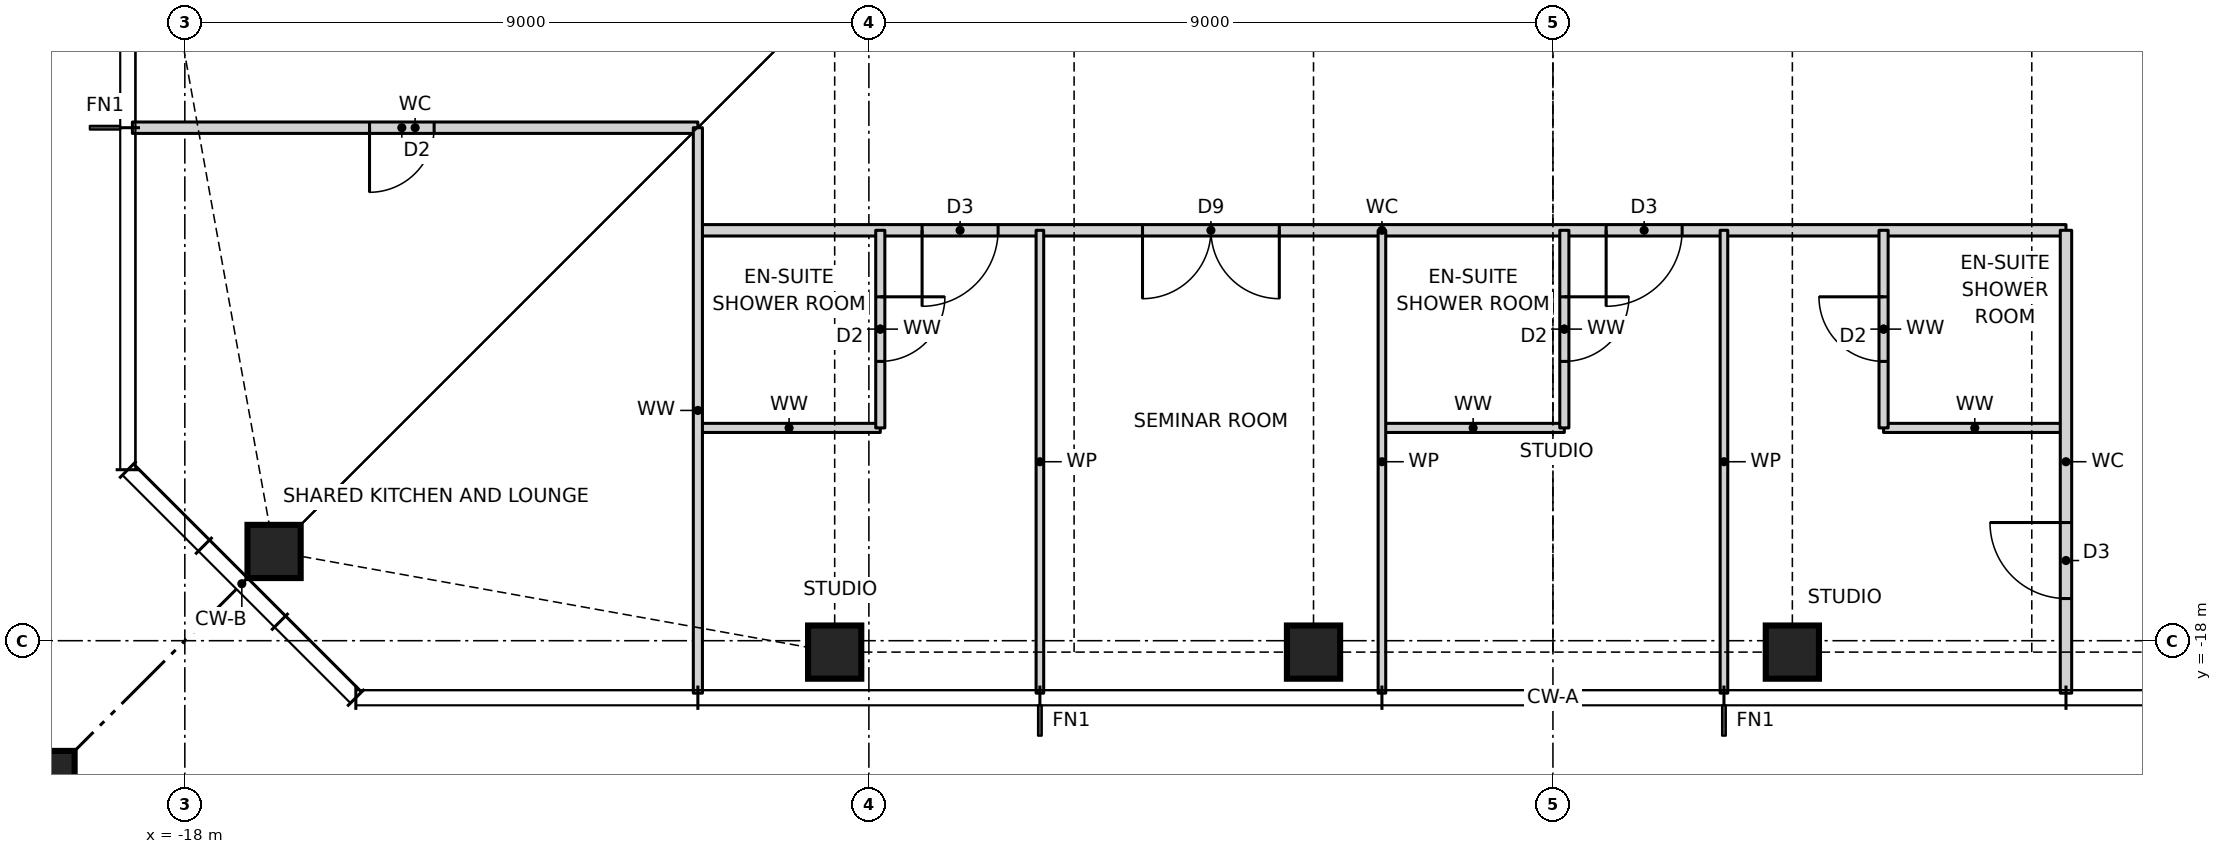
"""IFC4 building model, lengths in metres.
Left out: names, types, materials, properties, quantities, classifications, styles, units other than length and angle.
Written with IfcOpenShell. Run it as: python <this file> out.ifc"""

import sys

from ifc_helpers import new_model, si_unit, direction, frame, frame_2d, origin, origin_2d, place, context, subcontext, project, spatial, rectangle, hollow_rectangle, i_section, extrude, element, fill, save


model = new_model("IFC4")
c1 = context("Model", 3, precision=1e-05, world=origin(), true_north=direction((0.0, 1.0)))
c2 = subcontext(c1, "Body", "Model", "MODEL_VIEW")
j1 = project(units=[si_unit("LENGTHUNIT", "METRE"), si_unit("PLANEANGLEUNIT", "RADIAN")], contexts=[c1])
p1 = place(None, origin())
s1 = spatial("IfcSite", under=j1, at=p1, CompositionType="ELEMENT")
p2 = place(p1, origin())
s2 = spatial("IfcBuilding", under=s1, at=p2, CompositionType="ELEMENT")
p3 = place(p2, frame((0.0, 0.0, 156.5)))
s3 = spatial("IfcBuildingStorey", under=s2, at=p3, CompositionType="ELEMENT", Elevation=156.5)
for number, where, z_axis, x_axis in (
    (1, (-16.826, -16.826, 0.0), (0.0, 0.0, 1.0), (1.0, 0.0, 0.0)),
    (2, (-9.45, -18.15, 0.0), (0.0, 0.0, 1.0), (1.0, 0.0, 0.0)),
    (3, (-3.15, -18.15, 0.0), (0.0, 0.0, 1.0), (1.0, 0.0, 0.0)),
    (4, (3.15, -18.15, 0.0), (0.0, 0.0, 1.0), (1.0, 0.0, 0.0)),
):
    element("IfcColumn", number, at=place(p3, frame(where, z_axis=z_axis, x_axis=x_axis)), inside=s3, PredefinedType="COLUMN", context=c2, shape_type="SweptSolid", body=[
        extrude(hollow_rectangle(XDim=0.7, YDim=0.7, WallThickness=0.06, at=origin_2d()), origin(), (0.0, 0.0, 1.0), 3.5),
    ])
p4 = place(p3, frame((-21.65, -21.65, 0.0), z_axis=(0.0, 0.0, 1.0), x_axis=(1.0, 0.0, 0.0)))
e5 = element("IfcColumn", 5, at=p4, inside=s3, PredefinedType="COLUMN", context=c2, shape_type="SweptSolid", body=[
    extrude(rectangle(XDim=4.4, YDim=4.4, at=origin_2d()), origin(), (0.0, 0.0, 1.0), 3.5),
    extrude(i_section(OverallWidth=0.478, OverallDepth=0.599, WebThickness=0.1, FlangeThickness=0.14, at=origin_2d()), origin(), (0.0, 0.0, 1.0), 3.5),
])
for number, where, z_axis, x_axis in (
    (6, (-11.25, -15.2, 0.0), (0.0, 0.0, 1.0), (1.0, 0.0, 0.0)),
    (7, (-2.25, -15.2, 0.0), (0.0, 0.0, 1.0), (1.0, 0.0, 0.0)),
    (8, (4.35, -15.2, 0.0), (0.0, 0.0, 1.0), (1.0, 0.0, 0.0)),
):
    element("IfcWall", number, at=place(p3, frame(where, z_axis=z_axis, x_axis=x_axis)), inside=s3, PredefinedType="PARTITIONING", context=c2, shape_type="SweptSolid", body=[
        extrude(rectangle(XDim=2.4, YDim=0.12, at=frame_2d((1.2, 0.0))), origin(), (0.0, 0.0, 1.0), 3.27),
    ])
p5 = place(p3, frame((-11.25, -12.6, 0.0), z_axis=(0.0, 0.0, 1.0), x_axis=(1.0, 0.0, 0.0)))
e9 = element("IfcWall", 9, at=p5, inside=s3, PredefinedType="PARTITIONING", context=c2, shape_type="SweptSolid", body=[
    extrude(rectangle(XDim=18.0, YDim=0.15, at=frame_2d((9.0, 0.0))), origin(), (0.0, 0.0, 1.0), 3.27),
])
p6 = place(p5, frame((2.95, 0.0, 0.0)))
e10 = element("IfcOpeningElement", 10, at=p6, cuts=e9, PredefinedType="OPENING", context=c2, shape_type="SweptSolid", body=[
    extrude(rectangle(XDim=1.0, YDim=2.1, at=frame_2d((0.5, 1.05))), frame((0.0, 0.085, 0.0), z_axis=(0.0, -1.0, 0.0), x_axis=(1.0, 0.0, 0.0)), (0.0, 0.0, 1.0), 0.17),
])
p7 = place(p5, frame((5.85, 0.0, 0.0)))
e11 = element("IfcOpeningElement", 11, at=p7, cuts=e9, PredefinedType="OPENING", context=c2, shape_type="SweptSolid", body=[
    extrude(rectangle(XDim=1.8, YDim=2.1, at=frame_2d((0.9, 1.05))), frame((0.0, 0.085, 0.0), z_axis=(0.0, -1.0, 0.0), x_axis=(1.0, 0.0, 0.0)), (0.0, 0.0, 1.0), 0.17),
])
p8 = place(p5, frame((11.95, 0.0, 0.0)))
e12 = element("IfcOpeningElement", 12, at=p8, cuts=e9, PredefinedType="OPENING", context=c2, shape_type="SweptSolid", body=[
    extrude(rectangle(XDim=1.0, YDim=2.1, at=frame_2d((0.5, 1.05))), frame((0.0, 0.085, 0.0), z_axis=(0.0, -1.0, 0.0), x_axis=(1.0, 0.0, 0.0)), (0.0, 0.0, 1.0), 0.17),
])
p9 = place(p3, frame((-18.69, -11.25, 0.0), z_axis=(0.0, 0.0, 1.0), x_axis=(1.0, 0.0, 0.0)))
e13 = element("IfcWall", 13, at=p9, inside=s3, PredefinedType="PARTITIONING", context=c2, shape_type="SweptSolid", body=[
    extrude(rectangle(XDim=7.44, YDim=0.15, at=frame_2d((3.72, 0.0))), origin(), (0.0, 0.0, 1.0), 3.27),
])
p10 = place(p9, frame((3.12, 0.0, 0.0)))
e14 = element("IfcOpeningElement", 14, at=p10, cuts=e13, PredefinedType="OPENING", context=c2, shape_type="SweptSolid", body=[
    extrude(rectangle(XDim=0.85, YDim=2.1, at=frame_2d((0.425, 1.05))), frame((0.0, 0.085, 0.0), z_axis=(0.0, -1.0, 0.0), x_axis=(1.0, 0.0, 0.0)), (0.0, 0.0, 1.0), 0.17),
])
p11 = place(p3, frame((6.75, -18.69, 0.0), z_axis=(0.0, 0.0, 1.0), x_axis=(0.0, 1.0, 0.0)))
e15 = element("IfcWall", 15, at=p11, inside=s3, PredefinedType="PARTITIONING", context=c2, shape_type="SweptSolid", body=[
    extrude(rectangle(XDim=6.09, YDim=0.15, at=frame_2d((3.045, 0.0))), origin(), (0.0, 0.0, 1.0), 3.27),
])
p12 = place(p11, frame((1.245, 0.0, 0.0)))
e16 = element("IfcOpeningElement", 16, at=p12, cuts=e15, PredefinedType="OPENING", context=c2, shape_type="SweptSolid", body=[
    extrude(rectangle(XDim=1.0, YDim=2.1, at=frame_2d((0.5, 1.05))), frame((0.0, 0.085, 0.0), z_axis=(0.0, -1.0, 0.0), x_axis=(1.0, 0.0, 0.0)), (0.0, 0.0, 1.0), 0.17),
])
p13 = place(p3, frame((4.35, -15.2, 0.0), z_axis=(0.0, 0.0, 1.0), x_axis=(0.0, 1.0, 0.0)))
e17 = element("IfcWall", 17, at=p13, inside=s3, PredefinedType="PARTITIONING", context=c2, shape_type="SweptSolid", body=[
    extrude(rectangle(XDim=2.6, YDim=0.12, at=frame_2d((1.3, 0.0))), origin(), (0.0, 0.0, 1.0), 3.27),
])
p14 = place(p13, frame((0.875, 0.0, 0.0)))
e18 = element("IfcOpeningElement", 18, at=p14, cuts=e17, PredefinedType="OPENING", context=c2, shape_type="SweptSolid", body=[
    extrude(rectangle(XDim=0.85, YDim=2.1, at=frame_2d((0.425, 1.05))), frame((0.0, 0.07, 0.0), z_axis=(0.0, -1.0, 0.0), x_axis=(1.0, 0.0, 0.0)), (0.0, 0.0, 1.0), 0.14),
])
p15 = place(p3, frame((2.25, -18.69, 0.0), z_axis=(0.0, 0.0, 1.0), x_axis=(0.0, 1.0, 0.0)))
e19 = element("IfcWall", 19, at=p15, inside=s3, PredefinedType="PARTITIONING", context=c2, shape_type="SweptSolid", body=[
    extrude(rectangle(XDim=6.09, YDim=0.1, at=frame_2d((3.045, 0.0))), origin(), (0.0, 0.0, 1.0), 3.27),
])
p16 = place(p3, frame((0.15, -15.2, 0.0), z_axis=(0.0, 0.0, 1.0), x_axis=(0.0, 1.0, 0.0)))
e20 = element("IfcWall", 20, at=p16, inside=s3, PredefinedType="PARTITIONING", context=c2, shape_type="SweptSolid", body=[
    extrude(rectangle(XDim=2.6, YDim=0.12, at=frame_2d((1.3, 0.0))), origin(), (0.0, 0.0, 1.0), 3.27),
])
p17 = place(p16, frame((0.875, 0.0, 0.0)))
e21 = element("IfcOpeningElement", 21, at=p17, cuts=e20, PredefinedType="OPENING", context=c2, shape_type="SweptSolid", body=[
    extrude(rectangle(XDim=0.85, YDim=2.1, at=frame_2d((0.425, 1.05))), frame((0.0, 0.07, 0.0), z_axis=(0.0, -1.0, 0.0), x_axis=(1.0, 0.0, 0.0)), (0.0, 0.0, 1.0), 0.14),
])
for number, where, z_axis, x_axis in (
    (22, (-2.25, -18.69, 0.0), (0.0, 0.0, 1.0), (0.0, 1.0, 0.0)),
    (23, (-6.75, -18.69, 0.0), (0.0, 0.0, 1.0), (0.0, 1.0, 0.0)),
):
    element("IfcWall", number, at=place(p3, frame(where, z_axis=z_axis, x_axis=x_axis)), inside=s3, PredefinedType="PARTITIONING", context=c2, shape_type="SweptSolid", body=[
        extrude(rectangle(XDim=6.09, YDim=0.1, at=frame_2d((3.045, 0.0))), origin(), (0.0, 0.0, 1.0), 3.27),
    ])
p18 = place(p3, frame((-8.85, -15.2, 0.0), z_axis=(0.0, 0.0, 1.0), x_axis=(0.0, 1.0, 0.0)))
e24 = element("IfcWall", 24, at=p18, inside=s3, PredefinedType="PARTITIONING", context=c2, shape_type="SweptSolid", body=[
    extrude(rectangle(XDim=2.6, YDim=0.12, at=frame_2d((1.3, 0.0))), origin(), (0.0, 0.0, 1.0), 3.27),
])
p19 = place(p18, frame((0.875, 0.0, 0.0)))
e25 = element("IfcOpeningElement", 25, at=p19, cuts=e24, PredefinedType="OPENING", context=c2, shape_type="SweptSolid", body=[
    extrude(rectangle(XDim=0.85, YDim=2.1, at=frame_2d((0.425, 1.05))), frame((0.0, 0.07, 0.0), z_axis=(0.0, -1.0, 0.0), x_axis=(1.0, 0.0, 0.0)), (0.0, 0.0, 1.0), 0.14),
])
p20 = place(p3, frame((-11.25, -18.69, 0.0), z_axis=(0.0, 0.0, 1.0), x_axis=(0.0, 1.0, 0.0)))
e26 = element("IfcWall", 26, at=p20, inside=s3, PredefinedType="PARTITIONING", context=c2, shape_type="SweptSolid", body=[
    extrude(rectangle(XDim=7.44, YDim=0.12, at=frame_2d((3.72, 0.0))), origin(), (0.0, 0.0, 1.0), 3.27),
])
p21 = place(p6, frame((1.0, 0.0, 0.0), z_axis=(0.0, 0.0, 1.0), x_axis=(-1.0, 0.0, 0.0)))
e27 = element("IfcDoor", 27, at=p21, inside=s3, OperationType="SINGLE_SWING_RIGHT", PredefinedType="DOOR", context=c2, shape_type="SweptSolid", body=[
    extrude(rectangle(XDim=1.0, YDim=2.1, at=frame_2d((0.5, 1.05))), frame((0.0, 0.025, 0.0), z_axis=(0.0, -1.0, 0.0), x_axis=(1.0, 0.0, 0.0)), (0.0, 0.0, 1.0), 0.05),
])
fill(e10, e27)
p22 = place(p19, frame((0.85, 0.0, 0.0), z_axis=(0.0, 0.0, 1.0), x_axis=(-1.0, 0.0, 0.0)))
e28 = element("IfcDoor", 28, at=p22, inside=s3, OperationType="SINGLE_SWING_LEFT", PredefinedType="DOOR", context=c2, shape_type="SweptSolid", body=[
    extrude(rectangle(XDim=0.85, YDim=2.1, at=frame_2d((0.425, 1.05))), frame((0.0, 0.025, 0.0), z_axis=(0.0, -1.0, 0.0), x_axis=(1.0, 0.0, 0.0)), (0.0, 0.0, 1.0), 0.05),
])
fill(e25, e28)
p23 = place(p7, frame((1.8, 0.0, 0.0), z_axis=(0.0, 0.0, 1.0), x_axis=(-1.0, 0.0, 0.0)))
e29 = element("IfcDoor", 29, at=p23, inside=s3, OperationType="DOUBLE_DOOR_SINGLE_SWING", PredefinedType="DOOR", context=c2, shape_type="SweptSolid", body=[
    extrude(rectangle(XDim=1.8, YDim=2.1, at=frame_2d((0.9, 1.05))), frame((0.0, 0.025, 0.0), z_axis=(0.0, -1.0, 0.0), x_axis=(1.0, 0.0, 0.0)), (0.0, 0.0, 1.0), 0.05),
])
fill(e11, e29)
p24 = place(p8, frame((1.0, 0.0, 0.0), z_axis=(0.0, 0.0, 1.0), x_axis=(-1.0, 0.0, 0.0)))
e30 = element("IfcDoor", 30, at=p24, inside=s3, OperationType="SINGLE_SWING_RIGHT", PredefinedType="DOOR", context=c2, shape_type="SweptSolid", body=[
    extrude(rectangle(XDim=1.0, YDim=2.1, at=frame_2d((0.5, 1.05))), frame((0.0, 0.025, 0.0), z_axis=(0.0, -1.0, 0.0), x_axis=(1.0, 0.0, 0.0)), (0.0, 0.0, 1.0), 0.05),
])
fill(e12, e30)
p25 = place(p17, frame((0.85, 0.0, 0.0), z_axis=(0.0, 0.0, 1.0), x_axis=(-1.0, 0.0, 0.0)))
e31 = element("IfcDoor", 31, at=p25, inside=s3, OperationType="SINGLE_SWING_LEFT", PredefinedType="DOOR", context=c2, shape_type="SweptSolid", body=[
    extrude(rectangle(XDim=0.85, YDim=2.1, at=frame_2d((0.425, 1.05))), frame((0.0, 0.025, 0.0), z_axis=(0.0, -1.0, 0.0), x_axis=(1.0, 0.0, 0.0)), (0.0, 0.0, 1.0), 0.05),
])
fill(e21, e31)
p26 = place(p12, origin())
e32 = element("IfcDoor", 32, at=p26, inside=s3, OperationType="SINGLE_SWING_RIGHT", PredefinedType="DOOR", context=c2, shape_type="SweptSolid", body=[
    extrude(rectangle(XDim=1.0, YDim=2.1, at=frame_2d((0.5, 1.05))), frame((0.0, 0.025, 0.0), z_axis=(0.0, -1.0, 0.0), x_axis=(1.0, 0.0, 0.0)), (0.0, 0.0, 1.0), 0.05),
])
fill(e16, e32)
p27 = place(p14, origin())
e33 = element("IfcDoor", 33, at=p27, inside=s3, OperationType="SINGLE_SWING_RIGHT", PredefinedType="DOOR", context=c2, shape_type="SweptSolid", body=[
    extrude(rectangle(XDim=0.85, YDim=2.1, at=frame_2d((0.425, 1.05))), frame((0.0, 0.025, 0.0), z_axis=(0.0, -1.0, 0.0), x_axis=(1.0, 0.0, 0.0)), (0.0, 0.0, 1.0), 0.05),
])
fill(e18, e33)
p28 = place(p10, frame((0.85, 0.0, 0.0), z_axis=(0.0, 0.0, 1.0), x_axis=(-1.0, 0.0, 0.0)))
e34 = element("IfcDoor", 34, at=p28, inside=s3, OperationType="SINGLE_SWING_RIGHT", PredefinedType="DOOR", context=c2, shape_type="SweptSolid", body=[
    extrude(rectangle(XDim=0.85, YDim=2.1, at=frame_2d((0.425, 1.05))), frame((0.0, 0.025, 0.0), z_axis=(0.0, -1.0, 0.0), x_axis=(1.0, 0.0, 0.0)), (0.0, 0.0, 1.0), 0.05),
])
fill(e14, e34)
save(model, sys.argv[1])
